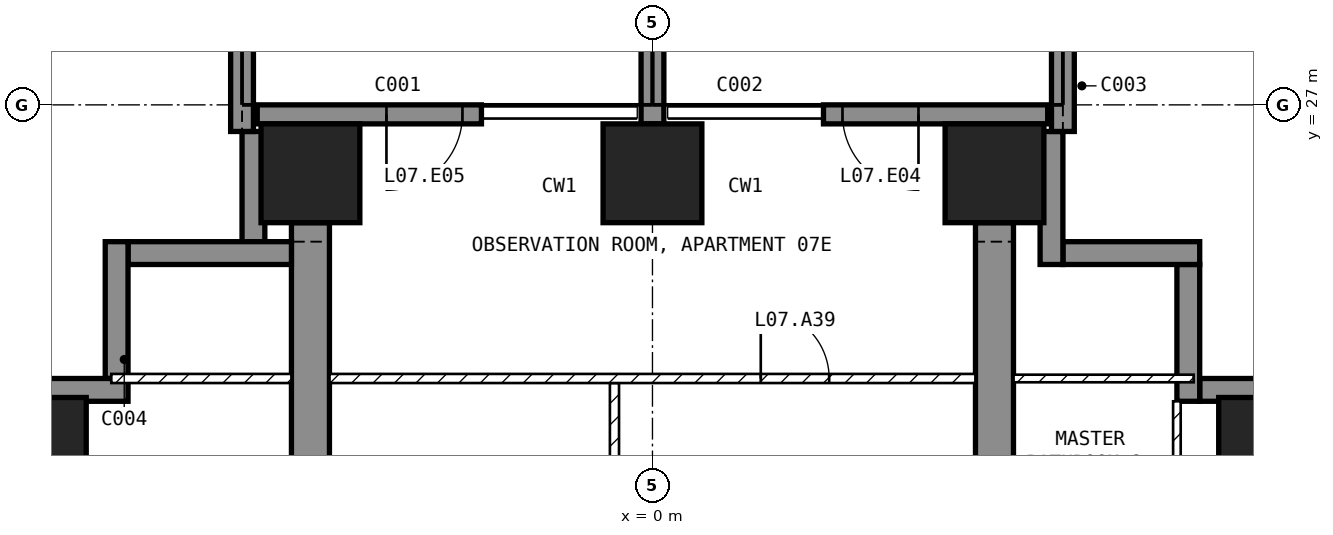
"""IFC4 building model, lengths in metres.
Left out: names, types, materials, properties, quantities, classifications, styles, units other than length and angle.
Written with IfcOpenShell. Run it as: python <this file> out.ifc"""

import sys

from ifc_helpers import new_model, si_unit, direction, frame, frame_2d, origin, origin_2d, place, context, subcontext, project, spatial, polyline, rectangle, outline, extrude, element, fill, save


model = new_model("IFC4")
c1 = context("Model", 3, precision=1e-05, world=origin(), true_north=direction((0.0, 1.0)))
c2 = subcontext(c1, "Body", "Model", "MODEL_VIEW")
j1 = project(units=[si_unit("LENGTHUNIT", "METRE"), si_unit("PLANEANGLEUNIT", "RADIAN")], contexts=[c1])
p1 = place(None, origin())
s1 = spatial("IfcSite", under=j1, at=p1, CompositionType="ELEMENT")
p2 = place(p1, origin())
s2 = spatial("IfcBuilding", under=s1, at=p2, CompositionType="ELEMENT")
p3 = place(p2, frame((0.0, 0.0, 43.5)))
s3 = spatial("IfcBuildingStorey", under=s2, at=p3, CompositionType="ELEMENT", Elevation=43.5)
for number, where, z_axis, x_axis in (
    (1, (-8.1, 22.5, -0.25), (0.0, 0.0, 1.0), (1.0, 0.0, 0.0)),
    (2, (-4.5, 26.1, -0.25), (0.0, 0.0, 1.0), (1.0, 0.0, 0.0)),
    (3, (0.0, 26.1, -0.25), (0.0, 0.0, 1.0), (1.0, 0.0, 0.0)),
    (4, (4.5, 26.1, -0.25), (0.0, 0.0, 1.0), (1.0, 0.0, 0.0)),
    (5, (8.1, 22.5, -0.25), (0.0, 0.0, 1.0), (1.0, 0.0, 0.0)),
):
    element("IfcColumn", number, at=place(p3, frame(where, z_axis=z_axis, x_axis=x_axis)), inside=s3, PredefinedType="COLUMN", context=c2, shape_type="SweptSolid", body=[
        extrude(rectangle(XDim=1.3, YDim=1.3, at=origin_2d()), origin(), (0.0, 0.0, 1.0), 3.5),
    ])
for number, where, z_axis, x_axis in (
    (6, (-4.75, 9.0, -0.25), (1.0, 0.0, 0.0), (0.0, 1.0, 0.0)),
    (7, (4.25, 9.0, -0.25), (1.0, 0.0, 0.0), (0.0, 1.0, 0.0)),
):
    element("IfcWall", number, at=place(p3, frame(where, z_axis=z_axis, x_axis=x_axis)), inside=s3, PredefinedType="SHEAR", context=c2, shape_type="SweptSolid", body=[
        extrude(outline(polyline([(0.0, 0.0), (2.1, 0.0), (2.1, 2.65), (4.5, 2.65), (4.5, 0.0), (9.9, 0.0), (9.9, 2.65), (12.3, 2.65), (12.3, 0.0), (16.45, 0.0), (16.45, 3.5), (0.0, 3.5), (0.0, 0.0)])), origin(), (0.0, 0.0, 1.0), 0.5),
    ])
p4 = place(p3, frame((5.2, 26.875, 0.0), z_axis=(0.0, 0.0, 1.0), x_axis=(-1.0, 0.0, 0.0)))
e8 = element("IfcWall", 8, at=p4, inside=s3, PredefinedType="SOLIDWALL", context=c2, shape_type="SweptSolid", body=[
    extrude(rectangle(XDim=2.95, YDim=0.25, at=frame_2d((1.475, 0.0))), origin(), (0.0, 0.0, 1.0), 3.25),
])
p5 = place(p4, frame((1.7, 0.0, 0.0)))
e9 = element("IfcOpeningElement", 9, at=p5, cuts=e8, PredefinedType="OPENING", context=c2, shape_type="SweptSolid", body=[
    extrude(rectangle(XDim=1.0, YDim=2.4, at=frame_2d((0.5, 1.2))), frame((0.0, 0.135, 0.0), z_axis=(0.0, -1.0, 0.0), x_axis=(1.0, 0.0, 0.0)), (0.0, 0.0, 1.0), 0.27),
])
p6 = place(p3, frame((-2.25, 26.875, 0.0), z_axis=(0.0, 0.0, 1.0), x_axis=(-1.0, 0.0, 0.0)))
e10 = element("IfcWall", 10, at=p6, inside=s3, PredefinedType="SOLIDWALL", context=c2, shape_type="SweptSolid", body=[
    extrude(rectangle(XDim=2.95, YDim=0.25, at=frame_2d((1.475, 0.0))), origin(), (0.0, 0.0, 1.0), 3.25),
])
p7 = place(p6, frame((0.25, 0.0, 0.0)))
e11 = element("IfcOpeningElement", 11, at=p7, cuts=e10, PredefinedType="OPENING", context=c2, shape_type="SweptSolid", body=[
    extrude(rectangle(XDim=1.0, YDim=2.4, at=frame_2d((0.5, 1.2))), frame((0.0, 0.135, 0.0), z_axis=(0.0, -1.0, 0.0), x_axis=(1.0, 0.0, 0.0)), (0.0, 0.0, 1.0), 0.27),
])
p8 = place(p3, frame((8.65, 23.25, 0.0), z_axis=(0.0, 0.0, 1.0), x_axis=(-1.0, 0.0, 0.0)))
e12 = element("IfcWall", 12, at=p8, inside=s3, PredefinedType="SOLIDWALL", context=c2, shape_type="SweptSolid", body=[
    extrude(rectangle(XDim=1.45, YDim=0.3, at=frame_2d((0.725, 0.0))), origin(), (0.0, 0.0, 1.0), 3.25),
])
p9 = place(p3, frame((7.05, 23.1, 0.0), z_axis=(0.0, 0.0, 1.0), x_axis=(0.0, 1.0, 0.0)))
e13 = element("IfcWall", 13, at=p9, inside=s3, PredefinedType="SOLIDWALL", context=c2, shape_type="SweptSolid", body=[
    extrude(rectangle(XDim=1.8, YDim=0.3, at=frame_2d((0.9, 0.0))), origin(), (0.0, 0.0, 1.0), 3.25),
])
p10 = place(p3, frame((7.2, 25.05, 0.0), z_axis=(0.0, 0.0, 1.0), x_axis=(-1.0, 0.0, 0.0)))
e14 = element("IfcWall", 14, at=p10, inside=s3, PredefinedType="SOLIDWALL", context=c2, shape_type="SweptSolid", body=[
    extrude(rectangle(XDim=1.8, YDim=0.3, at=frame_2d((0.9, 0.0))), origin(), (0.0, 0.0, 1.0), 3.25),
])
p11 = place(p3, frame((5.25, 24.9, 0.0), z_axis=(0.0, 0.0, 1.0), x_axis=(0.0, 1.0, 0.0)))
e15 = element("IfcWall", 15, at=p11, inside=s3, PredefinedType="SOLIDWALL", context=c2, shape_type="SweptSolid", body=[
    extrude(rectangle(XDim=1.75, YDim=0.3, at=frame_2d((0.875, 0.0))), origin(), (0.0, 0.0, 1.0), 3.25),
])
p12 = place(p3, frame((-5.25, 26.65, 0.0), z_axis=(0.0, 0.0, 1.0), x_axis=(0.0, -1.0, 0.0)))
e16 = element("IfcWall", 16, at=p12, inside=s3, PredefinedType="SOLIDWALL", context=c2, shape_type="SweptSolid", body=[
    extrude(rectangle(XDim=1.45, YDim=0.3, at=frame_2d((0.725, 0.0))), origin(), (0.0, 0.0, 1.0), 3.25),
])
p13 = place(p3, frame((-4.75, 25.05, 0.0), z_axis=(0.0, 0.0, 1.0), x_axis=(-1.0, 0.0, 0.0)))
e17 = element("IfcWall", 17, at=p13, inside=s3, PredefinedType="SOLIDWALL", context=c2, shape_type="SweptSolid", body=[
    extrude(rectangle(XDim=2.15, YDim=0.3, at=frame_2d((1.075, 0.0))), origin(), (0.0, 0.0, 1.0), 3.25),
])
p14 = place(p3, frame((-7.05, 25.2, 0.0), z_axis=(0.0, 0.0, 1.0), x_axis=(0.0, -1.0, 0.0)))
e18 = element("IfcWall", 18, at=p14, inside=s3, PredefinedType="SOLIDWALL", context=c2, shape_type="SweptSolid", body=[
    extrude(rectangle(XDim=1.8, YDim=0.3, at=frame_2d((0.9, 0.0))), origin(), (0.0, 0.0, 1.0), 3.25),
])
p15 = place(p3, frame((-6.9, 23.25, 0.0), z_axis=(0.0, 0.0, 1.0), x_axis=(-1.0, 0.0, 0.0)))
e19 = element("IfcWall", 19, at=p15, inside=s3, PredefinedType="SOLIDWALL", context=c2, shape_type="SweptSolid", body=[
    extrude(rectangle(XDim=1.75, YDim=0.3, at=frame_2d((0.875, 0.0))), origin(), (0.0, 0.0, 1.0), 3.25),
])
p16 = place(p3, frame((-5.4, 26.65, 0.0), z_axis=(0.0, 0.0, 1.0), x_axis=(0.0, 1.0, 0.0)))
e20 = element("IfcWall", 20, at=p16, inside=s3, PredefinedType="SOLIDWALL", context=c2, shape_type="SweptSolid", body=[
    extrude(rectangle(XDim=3.05, YDim=0.3, at=frame_2d((1.525, 0.0))), origin(), (0.0, 0.0, 1.0), 3.25),
])
p17 = place(p3, frame((0.0, 26.75, 0.0), z_axis=(0.0, 0.0, 1.0), x_axis=(0.0, 1.0, 0.0)))
e21 = element("IfcWall", 21, at=p17, inside=s3, PredefinedType="SOLIDWALL", context=c2, shape_type="SweptSolid", body=[
    extrude(rectangle(XDim=2.95, YDim=0.3, at=frame_2d((1.475, 0.0))), origin(), (0.0, 0.0, 1.0), 3.25),
])
p18 = place(p3, frame((5.4, 26.65, 0.0), z_axis=(0.0, 0.0, 1.0), x_axis=(0.0, 1.0, 0.0)))
e22 = element("IfcWall", 22, at=p18, inside=s3, PredefinedType="SOLIDWALL", context=c2, shape_type="SweptSolid", body=[
    extrude(rectangle(XDim=3.05, YDim=0.3, at=frame_2d((1.525, 0.0))), origin(), (0.0, 0.0, 1.0), 3.25),
])
p19 = place(p3, frame((-0.5, 18.96, 0.0), z_axis=(0.0, 0.0, 1.0), x_axis=(0.0, 1.0, 0.0)))
e23 = element("IfcWall", 23, at=p19, inside=s3, PredefinedType="PARTITIONING", context=c2, shape_type="SweptSolid", body=[
    extrude(rectangle(XDim=4.38, YDim=0.12, at=frame_2d((2.19, 0.0))), origin(), (0.0, 0.0, 1.0), 3.25),
])
p20 = place(p19, frame((1.74, 0.0, 0.0)))
e24 = element("IfcOpeningElement", 24, at=p20, cuts=e23, PredefinedType="OPENING", context=c2, shape_type="SweptSolid", body=[
    extrude(rectangle(XDim=0.9, YDim=2.1, at=frame_2d((0.45, 1.05))), frame((0.0, 0.07, 0.0), z_axis=(0.0, -1.0, 0.0), x_axis=(1.0, 0.0, 0.0)), (0.0, 0.0, 1.0), 0.14),
])
p21 = place(p3, frame((-4.25, 23.4, 0.0), z_axis=(0.0, 0.0, 1.0), x_axis=(1.0, 0.0, 0.0)))
e25 = element("IfcWall", 25, at=p21, inside=s3, PredefinedType="PARTITIONING", context=c2, shape_type="SweptSolid", body=[
    extrude(rectangle(XDim=8.5, YDim=0.12, at=frame_2d((4.25, 0.0))), origin(), (0.0, 0.0, 1.0), 3.25),
])
p22 = place(p21, frame((5.675, 0.0, 0.0)))
e26 = element("IfcOpeningElement", 26, at=p22, cuts=e25, PredefinedType="OPENING", context=c2, shape_type="SweptSolid", body=[
    extrude(rectangle(XDim=0.9, YDim=2.1, at=frame_2d((0.45, 1.05))), frame((0.0, 0.07, 0.0), z_axis=(0.0, -1.0, 0.0), x_axis=(1.0, 0.0, 0.0)), (0.0, 0.0, 1.0), 0.14),
])
p23 = place(p3, frame((6.9, 20.45, 0.0), z_axis=(0.0, 0.0, 1.0), x_axis=(0.0, 1.0, 0.0)))
e27 = element("IfcWall", 27, at=p23, inside=s3, PredefinedType="PARTITIONING", context=c2, shape_type="SweptSolid", body=[
    extrude(rectangle(XDim=2.65, YDim=0.1, at=frame_2d((1.325, 0.0))), origin(), (0.0, 0.0, 1.0), 3.25),
])
p24 = place(p3, frame((4.75, 23.4, 0.0), z_axis=(0.0, 0.0, 1.0), x_axis=(1.0, 0.0, 0.0)))
e28 = element("IfcWall", 28, at=p24, inside=s3, PredefinedType="PARTITIONING", context=c2, shape_type="SweptSolid", body=[
    extrude(rectangle(XDim=2.37, YDim=0.1, at=frame_2d((1.185, 0.0))), origin(), (0.0, 0.0, 1.0), 3.25),
])
p25 = place(p3, frame((-7.12, 23.4, 0.0), z_axis=(0.0, 0.0, 1.0), x_axis=(1.0, 0.0, 0.0)))
e29 = element("IfcWall", 29, at=p25, inside=s3, PredefinedType="PARTITIONING", context=c2, shape_type="SweptSolid", body=[
    extrude(rectangle(XDim=2.37, YDim=0.12, at=frame_2d((1.185, 0.0))), origin(), (0.0, 0.0, 1.0), 3.25),
])
p26 = place(p5, origin())
e30 = element("IfcDoor", 30, at=p26, inside=s3, OperationType="SINGLE_SWING_LEFT", PredefinedType="DOOR", context=c2, shape_type="SweptSolid", body=[
    extrude(rectangle(XDim=1.0, YDim=2.4, at=frame_2d((0.5, 1.2))), frame((0.0, 0.025, 0.0), z_axis=(0.0, -1.0, 0.0), x_axis=(1.0, 0.0, 0.0)), (0.0, 0.0, 1.0), 0.05),
])
fill(e9, e30)
p27 = place(p7, origin())
e31 = element("IfcDoor", 31, at=p27, inside=s3, OperationType="SINGLE_SWING_RIGHT", PredefinedType="DOOR", context=c2, shape_type="SweptSolid", body=[
    extrude(rectangle(XDim=1.0, YDim=2.4, at=frame_2d((0.5, 1.2))), frame((0.0, 0.025, 0.0), z_axis=(0.0, -1.0, 0.0), x_axis=(1.0, 0.0, 0.0)), (0.0, 0.0, 1.0), 0.05),
])
fill(e11, e31)
p28 = place(p22, origin())
e32 = element("IfcDoor", 32, at=p28, inside=s3, OperationType="SINGLE_SWING_LEFT", PredefinedType="DOOR", context=c2, shape_type="SweptSolid", body=[
    extrude(rectangle(XDim=0.9, YDim=2.1, at=frame_2d((0.45, 1.05))), frame((0.0, 0.025, 0.0), z_axis=(0.0, -1.0, 0.0), x_axis=(1.0, 0.0, 0.0)), (0.0, 0.0, 1.0), 0.05),
])
fill(e26, e32)
save(model, sys.argv[1])
